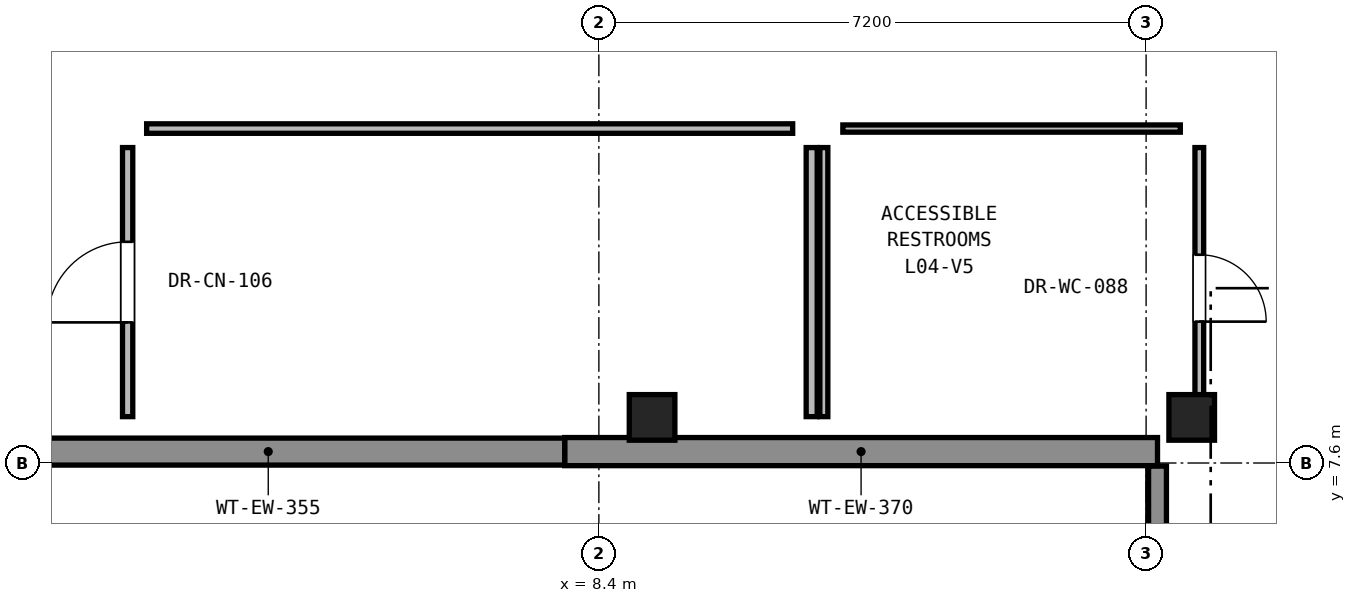
"""IFC4 building model, lengths in metres.
Left out: names, types, materials, properties, quantities, classifications, styles, units other than length and angle.
Written with IfcOpenShell. Run it as: python <this file> out.ifc"""

import sys

from ifc_helpers import new_model, si_unit, direction, frame, frame_2d, origin, origin_2d, place, context, subcontext, project, spatial, rectangle, extrude, element, fill, save


model = new_model("IFC4")
c1 = context("Model", 3, precision=1e-05, world=origin(), true_north=direction((0.0, 1.0)))
c2 = subcontext(c1, "Body", "Model", "MODEL_VIEW")
j1 = project(units=[si_unit("LENGTHUNIT", "METRE"), si_unit("PLANEANGLEUNIT", "RADIAN")], contexts=[c1])
p1 = place(None, origin())
s1 = spatial("IfcSite", under=j1, at=p1, CompositionType="ELEMENT")
p2 = place(p1, origin())
s2 = spatial("IfcBuilding", under=s1, at=p2, CompositionType="ELEMENT")
p3 = place(p2, frame((0.0, 0.0, 17.68)))
s3 = spatial("IfcBuildingStorey", under=s2, at=p3, CompositionType="ELEMENT", Elevation=17.68)
for number, where, z_axis, x_axis in (
    (1, (9.1, 8.2, 0.0), (0.0, 0.0, 1.0), (1.0, 0.0, 0.0)),
    (2, (16.2, 8.2, 0.0), (0.0, 0.0, 1.0), (1.0, 0.0, 0.0)),
):
    element("IfcColumn", number, at=place(p3, frame(where, z_axis=z_axis, x_axis=x_axis)), inside=s3, PredefinedType="COLUMN", context=c2, shape_type="SweptSolid", body=[
        extrude(rectangle(XDim=0.6, YDim=0.6, at=origin_2d()), origin(), (0.0, 0.0, 1.0), 4.08),
    ])
p4 = place(p3, frame((15.75, 0.34, 0.0), z_axis=(0.0, 0.0, 1.0), x_axis=(0.0, 1.0, 0.0)))
e3 = element("IfcWall", 3, at=p4, inside=s3, PredefinedType="SOLIDWALL", context=c2, shape_type="SweptSolid", body=[
    extrude(rectangle(XDim=7.22, YDim=0.235, at=frame_2d((3.61, 0.0))), origin(), (0.0, 0.0, 1.0), 3.72),
])
p5 = place(p3, frame((15.75, 7.75, 0.0), z_axis=(0.0, 0.0, 1.0), x_axis=(-1.0, 0.0, 0.0)))
e4 = element("IfcWall", 4, at=p5, inside=s3, PredefinedType="SOLIDWALL", context=c2, shape_type="SweptSolid", body=[
    extrude(rectangle(XDim=7.8, YDim=0.37, at=frame_2d((3.9, 0.0))), origin(), (0.0, 0.0, 1.0), 3.72),
])
p6 = place(p3, frame((7.95, 7.75, 0.0), z_axis=(0.0, 0.0, 1.0), x_axis=(-1.0, 0.0, 0.0)))
e5 = element("IfcWall", 5, at=p6, inside=s3, PredefinedType="SOLIDWALL", context=c2, shape_type="SweptSolid", body=[
    extrude(rectangle(XDim=7.8, YDim=0.355, at=frame_2d((3.9, 0.0))), origin(), (0.0, 0.0, 1.0), 3.72),
])
p7 = place(p3, frame((11.2, 11.75, 0.0), z_axis=(0.0, 0.0, 1.0), x_axis=(0.0, -1.0, 0.0)))
e6 = element("IfcWall", 6, at=p7, inside=s3, PredefinedType="PARTITIONING", context=c2, shape_type="SweptSolid", body=[
    extrude(rectangle(XDim=3.54, YDim=0.145, at=frame_2d((1.77, 0.0))), origin(), (0.0, 0.0, 1.0), 2.77),
])
p8 = place(p3, frame((2.2, 8.21, 0.0), z_axis=(0.0, 0.0, 1.0), x_axis=(0.0, 1.0, 0.0)))
e7 = element("IfcWall", 7, at=p8, inside=s3, PredefinedType="PARTITIONING", context=c2, shape_type="SweptSolid", body=[
    extrude(rectangle(XDim=3.54, YDim=0.135, at=frame_2d((1.77, 0.0))), origin(), (0.0, 0.0, 1.0), 2.77),
])
p9 = place(p8, frame((1.24, 0.0, 0.0)))
e8 = element("IfcOpeningElement", 8, at=p9, cuts=e7, PredefinedType="OPENING", context=c2, shape_type="SweptSolid", body=[
    extrude(rectangle(XDim=1.06, YDim=2.15, at=frame_2d((0.53, 1.075))), frame((0.0, 0.077, 0.0), z_axis=(0.0, -1.0, 0.0), x_axis=(1.0, 0.0, 0.0)), (0.0, 0.0, 1.0), 0.155),
])
p10 = place(p3, frame((2.45, 12.0, 0.0), z_axis=(0.0, 0.0, 1.0), x_axis=(1.0, 0.0, 0.0)))
e9 = element("IfcWall", 9, at=p10, inside=s3, PredefinedType="PARTITIONING", context=c2, shape_type="SweptSolid", body=[
    extrude(rectangle(XDim=8.5, YDim=0.125, at=frame_2d((4.25, 0.0))), origin(), (0.0, 0.0, 1.0), 3.17),
])
p11 = place(p3, frame((16.3, 11.75, 0.0), z_axis=(0.0, 0.0, 1.0), x_axis=(0.0, -1.0, 0.0)))
e10 = element("IfcWall", 10, at=p11, inside=s3, PredefinedType="PARTITIONING", context=c2, shape_type="SweptSolid", body=[
    extrude(rectangle(XDim=3.7, YDim=0.115, at=frame_2d((1.85, 0.0))), origin(), (0.0, 0.0, 1.0), 2.77),
])
p12 = place(p11, frame((1.41, 0.0, 0.0)))
e11 = element("IfcOpeningElement", 11, at=p12, cuts=e10, PredefinedType="OPENING", context=c2, shape_type="SweptSolid", body=[
    extrude(rectangle(XDim=0.88, YDim=2.1, at=frame_2d((0.44, 1.05))), frame((0.0, 0.067, 0.0), z_axis=(0.0, -1.0, 0.0), x_axis=(1.0, 0.0, 0.0)), (0.0, 0.0, 1.0), 0.135),
])
p13 = place(p3, frame((11.36, 8.21, 0.0), z_axis=(0.0, 0.0, 1.0), x_axis=(0.0, 1.0, 0.0)))
e12 = element("IfcWall", 12, at=p13, inside=s3, PredefinedType="PARTITIONING", context=c2, shape_type="SweptSolid", body=[
    extrude(rectangle(XDim=3.54, YDim=0.105, at=frame_2d((1.77, 0.0))), origin(), (0.0, 0.0, 1.0), 2.77),
])
p14 = place(p3, frame((11.61, 12.0, 0.0), z_axis=(0.0, 0.0, 1.0), x_axis=(1.0, 0.0, 0.0)))
e13 = element("IfcWall", 13, at=p14, inside=s3, PredefinedType="PARTITIONING", context=c2, shape_type="SweptSolid", body=[
    extrude(rectangle(XDim=4.44, YDim=0.095, at=frame_2d((2.22, 0.0))), origin(), (0.0, 0.0, 1.0), 3.02),
])
p15 = place(p9, origin())
e14 = element("IfcDoor", 14, at=p15, inside=s3, OperationType="SINGLE_SWING_LEFT", PredefinedType="DOOR", context=c2, shape_type="SweptSolid", body=[
    extrude(rectangle(XDim=1.06, YDim=2.15, at=frame_2d((0.53, 1.075))), frame((0.0, 0.025, 0.0), z_axis=(0.0, -1.0, 0.0), x_axis=(1.0, 0.0, 0.0)), (0.0, 0.0, 1.0), 0.05),
])
fill(e8, e14)
p16 = place(p12, origin())
e15 = element("IfcDoor", 15, at=p16, inside=s3, OperationType="SINGLE_SWING_RIGHT", PredefinedType="DOOR", context=c2, shape_type="SweptSolid", body=[
    extrude(rectangle(XDim=0.88, YDim=2.1, at=frame_2d((0.44, 1.05))), frame((0.0, 0.025, 0.0), z_axis=(0.0, -1.0, 0.0), x_axis=(1.0, 0.0, 0.0)), (0.0, 0.0, 1.0), 0.05),
])
fill(e11, e15)
save(model, sys.argv[1])
